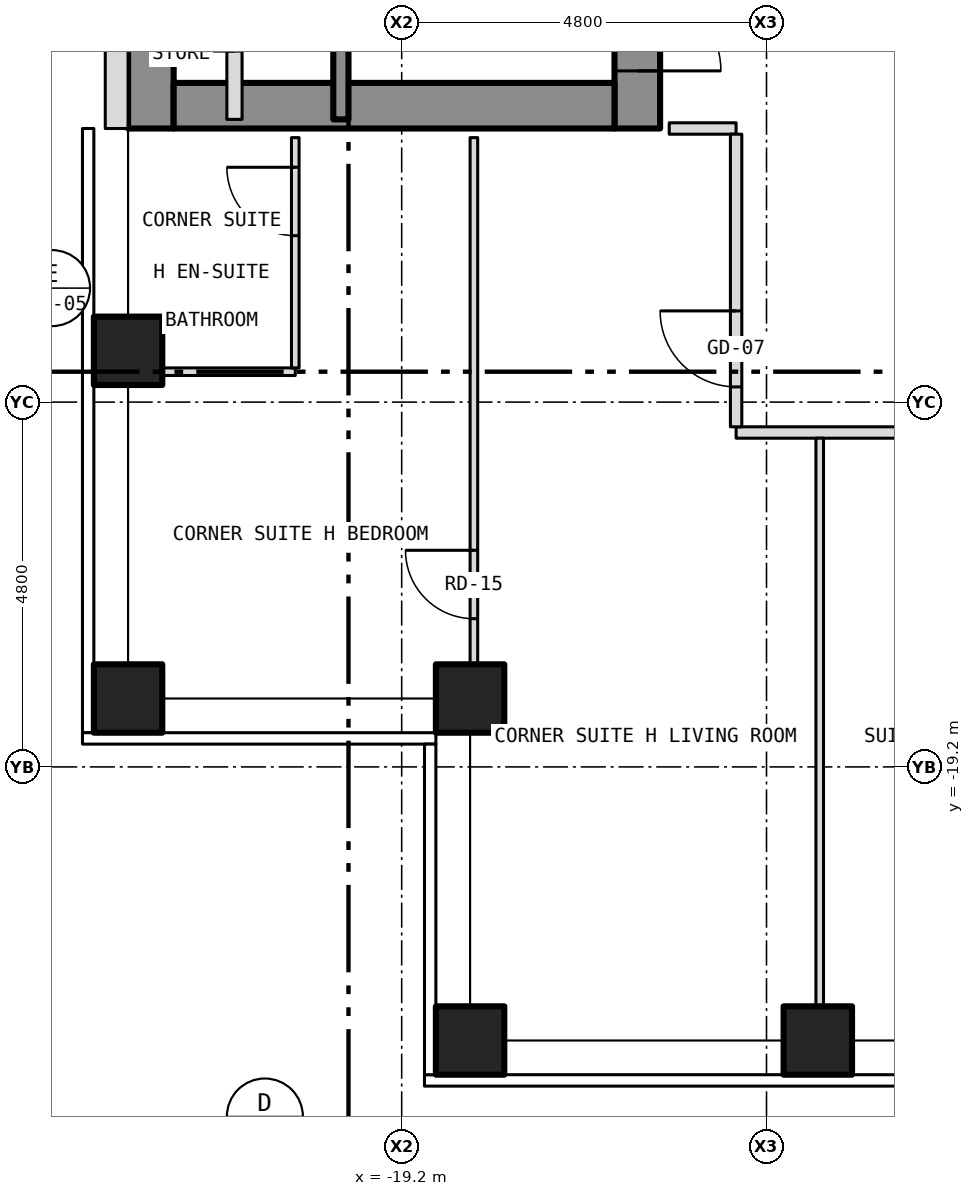
"""IFC4 building model, lengths in metres.
Left out: names, types, materials, properties, quantities, classifications, styles, units other than length and angle.
Written with IfcOpenShell. Run it as: python <this file> out.ifc"""

import sys

from ifc_helpers import new_model, si_unit, direction, frame, frame_2d, origin, origin_2d, place, context, subcontext, project, spatial, rectangle, hollow_rectangle, extrude, element, fill, save


model = new_model("IFC4")
c1 = context("Model", 3, precision=1e-05, world=origin(), true_north=direction((0.0, 1.0)))
c2 = subcontext(c1, "Body", "Model", "MODEL_VIEW")
j1 = project(units=[si_unit("LENGTHUNIT", "METRE"), si_unit("PLANEANGLEUNIT", "RADIAN")], contexts=[c1])
p1 = place(None, origin())
s1 = spatial("IfcSite", under=j1, at=p1, CompositionType="ELEMENT")
p2 = place(p1, origin())
s2 = spatial("IfcBuilding", under=s1, at=p2, CompositionType="ELEMENT")
p3 = place(p2, frame((0.0, 0.0, 113.5)))
s3 = spatial("IfcBuildingStorey", under=s2, at=p3, CompositionType="ELEMENT", Elevation=113.5)
for number, where, z_axis, x_axis in (
    (1, (-18.3, -22.8, -0.15), (0.0, 0.0, 1.0), (1.0, 0.0, 0.0)),
    (2, (-13.725, -22.8, -0.15), (0.0, 0.0, 1.0), (1.0, 0.0, 0.0)),
    (3, (-22.8, -18.3, -0.15), (0.0, 0.0, 1.0), (1.0, 0.0, 0.0)),
    (4, (-22.8, -13.725, -0.15), (0.0, 0.0, 1.0), (1.0, 0.0, 0.0)),
    (5, (-18.3, -18.3, -0.15), (0.0, 0.0, 1.0), (1.0, 0.0, 0.0)),
):
    element("IfcColumn", number, at=place(p3, frame(where, z_axis=z_axis, x_axis=x_axis)), inside=s3, PredefinedType="COLUMN", context=c2, shape_type="SweptSolid", body=[
        extrude(hollow_rectangle(XDim=0.9, YDim=0.9, WallThickness=0.05, at=origin_2d()), origin(), (0.0, 0.0, 1.0), 3.5),
    ])
p4 = place(p3, frame((-16.1, -10.8, 0.0), z_axis=(0.0, 0.0, 1.0), x_axis=(0.0, 1.0, 0.0)))
e6 = element("IfcWall", 6, at=p4, inside=s3, PredefinedType="SHEAR", context=c2, shape_type="SweptSolid", body=[
    extrude(rectangle(XDim=21.6, YDim=0.6, at=frame_2d((10.8, 0.0))), origin(), (0.0, 0.0, 1.0), 3.25),
])
p5 = place(p4, frame((9.4, 0.0, 0.0)))
e7 = element("IfcOpeningElement", 7, at=p5, cuts=e6, PredefinedType="OPENING", context=c2, shape_type="SweptSolid", body=[
    extrude(rectangle(XDim=1.1, YDim=2.1, at=frame_2d((0.55, 1.05))), frame((0.0, 0.312, 0.0), z_axis=(0.0, -1.0, 0.0), x_axis=(1.0, 0.0, 0.0)), (0.0, 0.0, 1.0), 0.624),
])
p6 = place(p4, frame((11.5, 0.0, 0.0)))
e8 = element("IfcOpeningElement", 8, at=p6, cuts=e6, PredefinedType="OPENING", context=c2, shape_type="SweptSolid", body=[
    extrude(rectangle(XDim=1.1, YDim=2.1, at=frame_2d((0.55, 1.05))), frame((0.0, 0.312, 0.0), z_axis=(0.0, -1.0, 0.0), x_axis=(1.0, 0.0, 0.0)), (0.0, 0.0, 1.0), 0.624),
])
p7 = place(p4, frame((13.6, 0.0, 0.0)))
e9 = element("IfcOpeningElement", 9, at=p7, cuts=e6, PredefinedType="OPENING", context=c2, shape_type="SweptSolid", body=[
    extrude(rectangle(XDim=1.1, YDim=2.1, at=frame_2d((0.55, 1.05))), frame((0.0, 0.312, 0.0), z_axis=(0.0, -1.0, 0.0), x_axis=(1.0, 0.0, 0.0)), (0.0, 0.0, 1.0), 0.624),
])
p8 = place(p4, frame((15.7, 0.0, 0.0)))
e10 = element("IfcOpeningElement", 10, at=p8, cuts=e6, PredefinedType="OPENING", context=c2, shape_type="SweptSolid", body=[
    extrude(rectangle(XDim=1.1, YDim=2.1, at=frame_2d((0.55, 1.05))), frame((0.0, 0.312, 0.0), z_axis=(0.0, -1.0, 0.0), x_axis=(1.0, 0.0, 0.0)), (0.0, 0.0, 1.0), 0.624),
])
p9 = place(p4, frame((17.8, 0.0, 0.0)))
e11 = element("IfcOpeningElement", 11, at=p9, cuts=e6, PredefinedType="OPENING", context=c2, shape_type="SweptSolid", body=[
    extrude(rectangle(XDim=1.1, YDim=2.1, at=frame_2d((0.55, 1.05))), frame((0.0, 0.312, 0.0), z_axis=(0.0, -1.0, 0.0), x_axis=(1.0, 0.0, 0.0)), (0.0, 0.0, 1.0), 0.624),
])
p10 = place(p4, frame((0.758, 0.0, 0.0)))
e12 = element("IfcOpeningElement", 12, at=p10, cuts=e6, PredefinedType="OPENING", context=c2, shape_type="SweptSolid", body=[
    extrude(rectangle(XDim=1.1, YDim=2.1, at=frame_2d((0.55, 1.05))), frame((0.0, 0.312, 0.0), z_axis=(0.0, -1.0, 0.0), x_axis=(1.0, 0.0, 0.0)), (0.0, 0.0, 1.0), 0.624),
])
p11 = place(p4, frame((7.5, 0.0, 0.0)))
e13 = element("IfcOpeningElement", 13, at=p11, cuts=e6, PredefinedType="OPENING", context=c2, shape_type="SweptSolid", body=[
    extrude(rectangle(XDim=1.1, YDim=2.1, at=frame_2d((0.55, 1.05))), frame((0.0, 0.312, 0.0), z_axis=(0.0, -1.0, 0.0), x_axis=(1.0, 0.0, 0.0)), (0.0, 0.0, 1.0), 0.624),
])
p12 = place(p3, frame((-22.5, -10.8, 0.0), z_axis=(0.0, 0.0, 1.0), x_axis=(0.0, 1.0, 0.0)))
e14 = element("IfcWall", 14, at=p12, inside=s3, PredefinedType="SHEAR", context=c2, shape_type="SweptSolid", body=[
    extrude(rectangle(XDim=21.6, YDim=0.6, at=frame_2d((10.8, 0.0))), origin(), (0.0, 0.0, 1.0), 3.25),
])
p13 = place(p3, frame((-22.2, -10.5, 0.0), z_axis=(0.0, 0.0, 1.0), x_axis=(1.0, 0.0, 0.0)))
e15 = element("IfcWall", 15, at=p13, inside=s3, PredefinedType="SHEAR", context=c2, shape_type="SweptSolid", body=[
    extrude(rectangle(XDim=5.8, YDim=0.6, at=frame_2d((2.9, 0.0))), origin(), (0.0, 0.0, 1.0), 3.25),
])
p14 = place(p3, frame((-22.95, 10.8, 0.0), z_axis=(0.0, 0.0, 1.0), x_axis=(0.0, -1.0, 0.0)))
e16 = element("IfcWall", 16, at=p14, inside=s3, PredefinedType="SOLIDWALL", context=c2, shape_type="SweptSolid", body=[
    extrude(rectangle(XDim=21.6, YDim=0.3, at=frame_2d((10.8, 0.0))), origin(), (0.0, 0.0, 1.0), 3.5),
])
p15 = place(p14, frame((18.05, 0.0, 1.0)))
e17 = element("IfcOpeningElement", 17, at=p15, cuts=e16, PredefinedType="OPENING", context=c2, shape_type="SweptSolid", body=[
    extrude(rectangle(XDim=0.6, YDim=1.5, at=frame_2d((0.3, 0.75))), frame((0.0, 0.162, 0.0), z_axis=(0.0, -1.0, 0.0), x_axis=(1.0, 0.0, 0.0)), (0.0, 0.0, 1.0), 0.324),
])
p16 = place(p3, frame((-14.8, -14.8, 0.0), z_axis=(0.0, 0.0, 1.0), x_axis=(1.0, 0.0, 0.0)))
e18 = element("IfcWall", 18, at=p16, inside=s3, PredefinedType="PARTITIONING", context=c2, shape_type="SweptSolid", body=[
    extrude(rectangle(XDim=29.6, YDim=0.15, at=frame_2d((14.8, 0.0))), origin(), (0.0, 0.0, 1.0), 3.35),
])
p17 = place(p16, frame((2.634, 0.0, 0.0)))
e19 = element("IfcOpeningElement", 19, at=p17, cuts=e18, PredefinedType="OPENING", context=c2, shape_type="SweptSolid", body=[
    extrude(rectangle(XDim=1.0, YDim=2.1, at=frame_2d((0.5, 1.05))), frame((0.0, 0.087, 0.0), z_axis=(0.0, -1.0, 0.0), x_axis=(1.0, 0.0, 0.0)), (0.0, 0.0, 1.0), 0.174),
])
p18 = place(p16, frame((20.362, 0.0, 0.0)))
e20 = element("IfcOpeningElement", 20, at=p18, cuts=e18, PredefinedType="OPENING", context=c2, shape_type="SweptSolid", body=[
    extrude(rectangle(XDim=1.0, YDim=2.1, at=frame_2d((0.5, 1.05))), frame((0.0, 0.087, 0.0), z_axis=(0.0, -1.0, 0.0), x_axis=(1.0, 0.0, 0.0)), (0.0, 0.0, 1.0), 0.174),
])
p19 = place(p16, frame((26.837, 0.0, 0.0)))
e21 = element("IfcOpeningElement", 21, at=p19, cuts=e18, PredefinedType="OPENING", context=c2, shape_type="SweptSolid", body=[
    extrude(rectangle(XDim=1.0, YDim=2.1, at=frame_2d((0.5, 1.05))), frame((0.0, 0.087, 0.0), z_axis=(0.0, -1.0, 0.0), x_axis=(1.0, 0.0, 0.0)), (0.0, 0.0, 1.0), 0.174),
])
p20 = place(p3, frame((-22.68, -14.0, 0.0), z_axis=(0.0, 0.0, 1.0), x_axis=(1.0, 0.0, 0.0)))
e22 = element("IfcWall", 22, at=p20, inside=s3, PredefinedType="PARTITIONING", context=c2, shape_type="SweptSolid", body=[
    extrude(rectangle(XDim=2.08, YDim=0.1, at=frame_2d((1.04, 0.0))), origin(), (0.0, 0.0, 1.0), 3.35),
])
p21 = place(p3, frame((-15.68, -10.8, 0.0), z_axis=(0.0, 0.0, 1.0), x_axis=(1.0, 0.0, 0.0)))
e23 = element("IfcWall", 23, at=p21, inside=s3, PredefinedType="PARTITIONING", context=c2, shape_type="SweptSolid", body=[
    extrude(rectangle(XDim=0.88, YDim=0.15, at=frame_2d((0.44, 0.0))), origin(), (0.0, 0.0, 1.0), 3.35),
])
p22 = place(p3, frame((-21.4, -10.68, 0.0), z_axis=(0.0, 0.0, 1.0), x_axis=(0.0, 1.0, 0.0)))
e24 = element("IfcWall", 24, at=p22, inside=s3, PredefinedType="PARTITIONING", context=c2, shape_type="SweptSolid", body=[
    extrude(rectangle(XDim=8.68, YDim=0.2, at=frame_2d((4.34, 0.0))), origin(), (0.0, 0.0, 1.0), 3.25),
])
p23 = place(p22, frame((0.899, 0.0, 0.0)))
e25 = element("IfcOpeningElement", 25, at=p23, cuts=e24, PredefinedType="OPENING", context=c2, shape_type="SweptSolid", body=[
    extrude(rectangle(XDim=0.9, YDim=2.1, at=frame_2d((0.45, 1.05))), frame((0.0, 0.112, 0.0), z_axis=(0.0, -1.0, 0.0), x_axis=(1.0, 0.0, 0.0)), (0.0, 0.0, 1.0), 0.224),
])
p24 = place(p22, frame((3.88, 0.0, 0.0)))
e26 = element("IfcOpeningElement", 26, at=p24, cuts=e24, PredefinedType="OPENING", context=c2, shape_type="SweptSolid", body=[
    extrude(rectangle(XDim=0.9, YDim=2.1, at=frame_2d((0.45, 1.05))), frame((0.0, 0.112, 0.0), z_axis=(0.0, -1.0, 0.0), x_axis=(1.0, 0.0, 0.0)), (0.0, 0.0, 1.0), 0.224),
])
p25 = place(p22, frame((6.862, 0.0, 0.0)))
e27 = element("IfcOpeningElement", 27, at=p25, cuts=e24, PredefinedType="OPENING", context=c2, shape_type="SweptSolid", body=[
    extrude(rectangle(XDim=0.9, YDim=2.1, at=frame_2d((0.45, 1.05))), frame((0.0, 0.112, 0.0), z_axis=(0.0, -1.0, 0.0), x_axis=(1.0, 0.0, 0.0)), (0.0, 0.0, 1.0), 0.224),
])
p26 = place(p3, frame((-20.6, -13.95, 0.0), z_axis=(0.0, 0.0, 1.0), x_axis=(0.0, 1.0, 0.0)))
e28 = element("IfcWall", 28, at=p26, inside=s3, PredefinedType="PARTITIONING", context=c2, shape_type="SweptSolid", body=[
    extrude(rectangle(XDim=3.03, YDim=0.1, at=frame_2d((1.515, 0.0))), origin(), (0.0, 0.0, 1.0), 3.35),
])
p27 = place(p26, frame((1.74, 0.0, 0.0)))
e29 = element("IfcOpeningElement", 29, at=p27, cuts=e28, PredefinedType="OPENING", context=c2, shape_type="SweptSolid", body=[
    extrude(rectangle(XDim=0.9, YDim=2.1, at=frame_2d((0.45, 1.05))), frame((0.0, 0.062, 0.0), z_axis=(0.0, -1.0, 0.0), x_axis=(1.0, 0.0, 0.0)), (0.0, 0.0, 1.0), 0.124),
])
p28 = place(p3, frame((-20.0, -10.68, 0.0), z_axis=(0.0, 0.0, 1.0), x_axis=(0.0, 1.0, 0.0)))
e30 = element("IfcWall", 30, at=p28, inside=s3, PredefinedType="SHEAR", context=c2, shape_type="SweptSolid", body=[
    extrude(rectangle(XDim=6.98, YDim=0.2, at=frame_2d((3.49, 0.0))), origin(), (0.0, 0.0, 1.0), 3.25),
])
p29 = place(p3, frame((-18.25, -18.191, 0.0), z_axis=(0.0, 0.0, 1.0), x_axis=(0.0, 1.0, 0.0)))
e31 = element("IfcWall", 31, at=p29, inside=s3, PredefinedType="PARTITIONING", context=c2, shape_type="SweptSolid", body=[
    extrude(rectangle(XDim=7.271, YDim=0.1, at=frame_2d((3.635, 0.0))), origin(), (0.0, 0.0, 1.0), 3.35),
])
p30 = place(p29, frame((0.941, 0.0, 0.0)))
e32 = element("IfcOpeningElement", 32, at=p30, cuts=e31, PredefinedType="OPENING", context=c2, shape_type="SweptSolid", body=[
    extrude(rectangle(XDim=0.9, YDim=2.1, at=frame_2d((0.45, 1.05))), frame((0.0, 0.062, 0.0), z_axis=(0.0, -1.0, 0.0), x_axis=(1.0, 0.0, 0.0)), (0.0, 0.0, 1.0), 0.124),
])
p31 = place(p3, frame((-14.8, -14.725, 0.0), z_axis=(0.0, 0.0, 1.0), x_axis=(0.0, 1.0, 0.0)))
e33 = element("IfcWall", 33, at=p31, inside=s3, PredefinedType="PARTITIONING", context=c2, shape_type="SweptSolid", body=[
    extrude(rectangle(XDim=3.85, YDim=0.15, at=frame_2d((1.925, 0.0))), origin(), (0.0, 0.0, 1.0), 3.35),
])
p32 = place(p31, frame((0.525, 0.0, 0.0)))
e34 = element("IfcOpeningElement", 34, at=p32, cuts=e33, PredefinedType="OPENING", context=c2, shape_type="SweptSolid", body=[
    extrude(rectangle(XDim=1.0, YDim=2.1, at=frame_2d((0.5, 1.05))), frame((0.0, 0.087, 0.0), z_axis=(0.0, -1.0, 0.0), x_axis=(1.0, 0.0, 0.0)), (0.0, 0.0, 1.0), 0.174),
])
p33 = place(p3, frame((-13.7, -22.68, 0.0), z_axis=(0.0, 0.0, 1.0), x_axis=(0.0, 1.0, 0.0)))
e35 = element("IfcWall", 35, at=p33, inside=s3, PredefinedType="PARTITIONING", context=c2, shape_type="SweptSolid", body=[
    extrude(rectangle(XDim=7.805, YDim=0.1, at=frame_2d((3.902, 0.0))), origin(), (0.0, 0.0, 1.0), 3.35),
])
p34 = place(p10, origin())
e36 = element("IfcDoor", 36, at=p34, inside=s3, OperationType="SINGLE_SWING_LEFT", PredefinedType="DOOR", context=c2, shape_type="SweptSolid", body=[
    extrude(rectangle(XDim=1.1, YDim=2.1, at=frame_2d((0.55, 1.05))), frame((0.0, 0.025, 0.0), z_axis=(0.0, -1.0, 0.0), x_axis=(1.0, 0.0, 0.0)), (0.0, 0.0, 1.0), 0.05),
])
fill(e12, e36)
p35 = place(p32, origin())
e37 = element("IfcDoor", 37, at=p35, inside=s3, OperationType="SINGLE_SWING_RIGHT", PredefinedType="DOOR", context=c2, shape_type="SweptSolid", body=[
    extrude(rectangle(XDim=1.0, YDim=2.1, at=frame_2d((0.5, 1.05))), frame((0.0, 0.025, 0.0), z_axis=(0.0, -1.0, 0.0), x_axis=(1.0, 0.0, 0.0)), (0.0, 0.0, 1.0), 0.05),
])
fill(e34, e37)
p36 = place(p30, origin())
e38 = element("IfcDoor", 38, at=p36, inside=s3, OperationType="SINGLE_SWING_RIGHT", PredefinedType="DOOR", context=c2, shape_type="SweptSolid", body=[
    extrude(rectangle(XDim=0.9, YDim=2.1, at=frame_2d((0.45, 1.05))), frame((0.0, 0.025, 0.0), z_axis=(0.0, -1.0, 0.0), x_axis=(1.0, 0.0, 0.0)), (0.0, 0.0, 1.0), 0.05),
])
fill(e32, e38)
p37 = place(p27, origin())
e39 = element("IfcDoor", 39, at=p37, inside=s3, OperationType="SINGLE_SWING_RIGHT", PredefinedType="DOOR", context=c2, shape_type="SweptSolid", body=[
    extrude(rectangle(XDim=0.9, YDim=2.1, at=frame_2d((0.45, 1.05))), frame((0.0, 0.025, 0.0), z_axis=(0.0, -1.0, 0.0), x_axis=(1.0, 0.0, 0.0)), (0.0, 0.0, 1.0), 0.05),
])
fill(e29, e39)
save(model, sys.argv[1])
